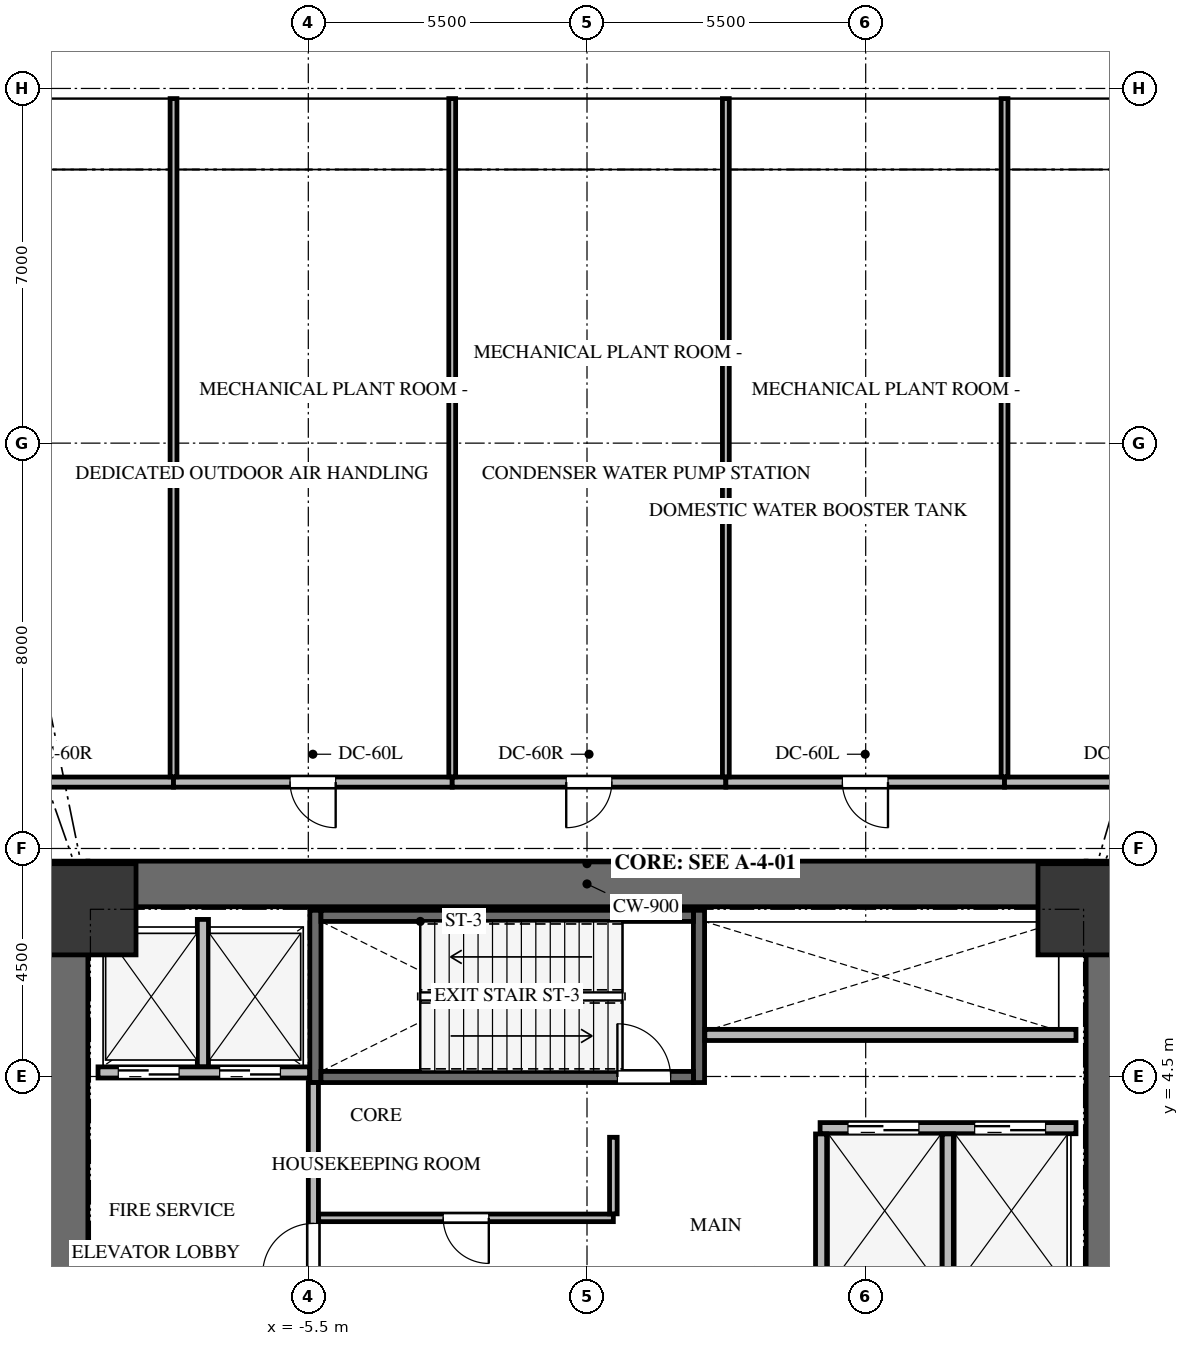
"""IFC4 building model, lengths in metres.
Left out: names, types, materials, properties, quantities, classifications, styles, units other than length and angle.
Written with IfcOpenShell. Run it as: python <this file> out.ifc"""

import sys

from ifc_helpers import new_model, si_unit, direction, frame, frame_2d, origin, origin_2d, place, context, subcontext, project, spatial, rectangle, extrude, source, transform, mapped, element, fill, save


model = new_model("IFC4")
c1 = context("Model", 3, precision=1e-05, world=origin(), true_north=direction((0.0, 1.0)))
c2 = subcontext(c1, "Body", "Model", "MODEL_VIEW")
j1 = project(units=[si_unit("LENGTHUNIT", "METRE"), si_unit("PLANEANGLEUNIT", "RADIAN")], contexts=[c1])
p1 = place(None, origin())
s1 = spatial("IfcSite", under=j1, at=p1, CompositionType="ELEMENT")
p2 = place(p1, origin())
s2 = spatial("IfcBuilding", under=s1, at=p2, CompositionType="ELEMENT")
p3 = place(p2, frame((0.0, 0.0, 10.4)))
s3 = spatial("IfcBuildingStorey", under=s2, at=p3, CompositionType="ELEMENT", Elevation=10.4)
for number, where, z_axis, x_axis in (
    (1, (-10.3, -8.75, 0.0), (0.0, 0.0, 1.0), (0.0, 1.0, 0.0)),
    (2, (10.3, -8.75, 0.0), (0.0, 0.0, 1.0), (0.0, 1.0, 0.0)),
):
    element("IfcWall", number, at=place(p3, frame(where, z_axis=z_axis, x_axis=x_axis)), inside=s3, PredefinedType="SHEAR", context=c2, shape_type="SweptSolid", body=[
        extrude(rectangle(XDim=17.5, YDim=0.9, at=frame_2d((8.75, 0.0))), origin(), (0.0, 0.0, 1.0), 5.2),
    ])
p4 = place(p3, frame((-9.85, 8.3, 0.0), z_axis=(0.0, 0.0, 1.0), x_axis=(1.0, 0.0, 0.0)))
e3 = element("IfcWall", 3, at=p4, inside=s3, PredefinedType="SHEAR", context=c2, shape_type="SweptSolid", body=[
    extrude(rectangle(XDim=19.7, YDim=0.9, at=frame_2d((9.85, 0.0))), origin(), (0.0, 0.0, 1.0), 5.2),
])
for number, where, z_axis, x_axis in (
    (4, (2.21, 4.38, -0.35), (0.0, 0.0, 1.0), (0.0, 1.0, 0.0)),
    (5, (-5.36, 7.78, -0.35), (0.0, 0.0, 1.0), (0.0, -1.0, 0.0)),
):
    element("IfcWall", number, at=place(p3, frame(where, z_axis=z_axis, x_axis=x_axis)), inside=s3, PredefinedType="SHEAR", context=c2, shape_type="SweptSolid", body=[
        extrude(rectangle(XDim=3.4, YDim=0.22, at=frame_2d((1.7, 0.0))), origin(), (0.0, 0.0, 1.0), 5.23),
    ])
p5 = place(p3, frame((-5.25, 4.49, -0.35), z_axis=(0.0, 0.0, 1.0), x_axis=(1.0, 0.0, 0.0)))
e6 = element("IfcWall", 6, at=p5, inside=s3, PredefinedType="SHEAR", context=c2, shape_type="SweptSolid", body=[
    extrude(rectangle(XDim=7.35, YDim=0.22, at=frame_2d((3.675, 0.0))), origin(), (0.0, 0.0, 1.0), 5.23),
])
p6 = place(p5, frame((5.85, 0.0, 0.0)))
e7 = element("IfcOpeningElement", 7, at=p6, cuts=e6, PredefinedType="OPENING", context=c2, shape_type="SweptSolid", body=[
    extrude(rectangle(XDim=1.05, YDim=2.15, at=frame_2d((0.525, 1.075))), frame((0.0, 0.12, 0.0), z_axis=(0.0, -1.0, 0.0), x_axis=(1.0, 0.0, 0.0)), (0.0, 0.0, 1.0), 0.24),
])
p7 = place(p3, frame((2.1, 7.67, -0.35), z_axis=(0.0, 0.0, 1.0), x_axis=(-1.0, 0.0, 0.0)))
e8 = element("IfcWall", 8, at=p7, inside=s3, PredefinedType="SHEAR", context=c2, shape_type="SweptSolid", body=[
    extrude(rectangle(XDim=7.35, YDim=0.22, at=frame_2d((3.675, 0.0))), origin(), (0.0, 0.0, 1.0), 5.23),
])
m1 = source(origin(), c2, "Body", "SweptSolid", [
    extrude(rectangle(XDim=1.8, YDim=1.8, at=origin_2d()), origin(), (0.0, 0.0, 1.0), 5.23),
])
for number, where, z_axis, x_axis in (
    (9, (9.8, 7.8, -0.35), (0.0, 0.0, 1.0), (1.0, 0.0, 0.0)),
    (10, (-9.8, 7.8, -0.35), (0.0, 0.0, 1.0), (1.0, 0.0, 0.0)),
):
    element("IfcColumn", number, at=place(p3, frame(where, z_axis=z_axis, x_axis=x_axis)), inside=s3, PredefinedType="COLUMN", context=c2, shape_type="MappedRepresentation", body=[
        mapped(m1, transform((0.0, 0.0, 0.0), x_axis=(1.0, 0.0, 0.0), y_axis=(0.0, 1.0, 0.0), z_axis=(0.0, 0.0, 1.0), scale=1.0)),
    ])
p8 = place(p3, frame((-9.65, 4.58, 0.0), z_axis=(0.0, 0.0, 1.0), x_axis=(1.0, 0.0, 0.0)))
e11 = element("IfcWall", 11, at=p8, inside=s3, PredefinedType="SOLIDWALL", context=c2, shape_type="SweptSolid", body=[
    extrude(rectangle(XDim=4.175, YDim=0.22, at=frame_2d((2.087, 0.0))), origin(), (0.0, 0.0, 1.0), 4.865),
])
p9 = place(p8, frame((0.4, 0.0, 0.0)))
e12 = element("IfcOpeningElement", 12, at=p9, cuts=e11, PredefinedType="OPENING", context=c2, shape_type="SweptSolid", body=[
    extrude(rectangle(XDim=1.2, YDim=2.15, at=frame_2d((0.6, 1.075))), frame((0.0, 0.12, 0.0), z_axis=(0.0, -1.0, 0.0), x_axis=(1.0, 0.0, 0.0)), (0.0, 0.0, 1.0), 0.24),
])
p10 = place(p8, frame((2.4, 0.0, 0.0)))
e13 = element("IfcOpeningElement", 13, at=p10, cuts=e11, PredefinedType="OPENING", context=c2, shape_type="SweptSolid", body=[
    extrude(rectangle(XDim=1.2, YDim=2.15, at=frame_2d((0.6, 1.075))), frame((0.0, 0.12, 0.0), z_axis=(0.0, -1.0, 0.0), x_axis=(1.0, 0.0, 0.0)), (0.0, 0.0, 1.0), 0.24),
])
p11 = place(p3, frame((-7.58, 4.694, 0.0), z_axis=(0.0, 0.0, 1.0), x_axis=(0.0, 1.0, 0.0)))
e14 = element("IfcWall", 14, at=p11, inside=s3, PredefinedType="SOLIDWALL", context=c2, shape_type="SweptSolid", body=[
    extrude(rectangle(XDim=2.906, YDim=0.22, at=frame_2d((1.453, 0.0))), origin(), (0.0, 0.0, 1.0), 4.865),
])
p12 = place(p3, frame((-5.4, 0.354, 0.0), z_axis=(0.0, 0.0, 1.0), x_axis=(0.0, 1.0, 0.0)))
e15 = element("IfcWall", 15, at=p12, inside=s3, PredefinedType="SOLIDWALL", context=c2, shape_type="SweptSolid", body=[
    extrude(rectangle(XDim=4.026, YDim=0.2, at=frame_2d((2.013, 0.0))), origin(), (0.0, 0.0, 1.0), 4.865),
])
p13 = place(p12, frame((0.246, 0.0, 0.0)))
e16 = element("IfcOpeningElement", 16, at=p13, cuts=e15, PredefinedType="OPENING", context=c2, shape_type="SweptSolid", body=[
    extrude(rectangle(XDim=1.0, YDim=2.15, at=frame_2d((0.5, 1.075))), frame((0.0, 0.11, 0.0), z_axis=(0.0, -1.0, 0.0), x_axis=(1.0, 0.0, 0.0)), (0.0, 0.0, 1.0), 0.22),
])
p14 = place(p3, frame((4.6, 3.48, 0.0), z_axis=(0.0, 0.0, 1.0), x_axis=(1.0, 0.0, 0.0)))
e17 = element("IfcWall", 17, at=p14, inside=s3, PredefinedType="SOLIDWALL", context=c2, shape_type="SweptSolid", body=[
    extrude(rectangle(XDim=5.05, YDim=0.22, at=frame_2d((2.525, 0.0))), origin(), (0.0, 0.0, 1.0), 4.865),
])
p15 = place(p14, frame((0.55, 0.0, 0.0)))
e18 = element("IfcOpeningElement", 18, at=p15, cuts=e17, PredefinedType="OPENING", context=c2, shape_type="SweptSolid", body=[
    extrude(rectangle(XDim=1.4, YDim=2.15, at=frame_2d((0.7, 1.075))), frame((0.0, 0.12, 0.0), z_axis=(0.0, -1.0, 0.0), x_axis=(1.0, 0.0, 0.0)), (0.0, 0.0, 1.0), 0.24),
])
p16 = place(p14, frame((3.05, 0.0, 0.0)))
e19 = element("IfcOpeningElement", 19, at=p16, cuts=e17, PredefinedType="OPENING", context=c2, shape_type="SweptSolid", body=[
    extrude(rectangle(XDim=1.4, YDim=2.15, at=frame_2d((0.7, 1.075))), frame((0.0, 0.12, 0.0), z_axis=(0.0, -1.0, 0.0), x_axis=(1.0, 0.0, 0.0)), (0.0, 0.0, 1.0), 0.24),
])
for number, where, z_axis, x_axis in (
    (20, (4.62, 0.18, 0.0), (0.0, 0.0, 1.0), (0.0, 1.0, 0.0)),
    (21, (7.12, 0.18, 0.0), (0.0, 0.0, 1.0), (0.0, 1.0, 0.0)),
):
    element("IfcWall", number, at=place(p3, frame(where, z_axis=z_axis, x_axis=x_axis)), inside=s3, PredefinedType="SOLIDWALL", context=c2, shape_type="SweptSolid", body=[
        extrude(rectangle(XDim=3.186, YDim=0.22, at=frame_2d((1.593, 0.0))), origin(), (0.0, 0.0, 1.0), 4.865),
    ])
p17 = place(p3, frame((2.325, 5.32, 0.0), z_axis=(0.0, 0.0, 1.0), x_axis=(1.0, 0.0, 0.0)))
e22 = element("IfcWall", 22, at=p17, inside=s3, PredefinedType="SOLIDWALL", context=c2, shape_type="SweptSolid", body=[
    extrude(rectangle(XDim=7.325, YDim=0.22, at=frame_2d((3.663, 0.0))), origin(), (0.0, 0.0, 1.0), 4.865),
])
p18 = place(p3, frame((0.52, 1.71, 0.0), z_axis=(0.0, 0.0, 1.0), x_axis=(-1.0, 0.0, 0.0)))
e23 = element("IfcWall", 23, at=p18, inside=s3, PredefinedType="PARTITIONING", context=c2, shape_type="SweptSolid", body=[
    extrude(rectangle(XDim=5.816, YDim=0.15, at=frame_2d((2.908, 0.0))), origin(), (0.0, 0.0, 1.0), 4.865),
])
p19 = place(p18, frame((2.458, 0.0, 0.0)))
e24 = element("IfcOpeningElement", 24, at=p19, cuts=e23, PredefinedType="OPENING", context=c2, shape_type="SweptSolid", body=[
    extrude(rectangle(XDim=0.9, YDim=2.05, at=frame_2d((0.45, 1.025))), frame((0.0, 0.085, 0.0), z_axis=(0.0, -1.0, 0.0), x_axis=(1.0, 0.0, 0.0)), (0.0, 0.0, 1.0), 0.17),
])
p20 = place(p3, frame((0.52, 3.3, 0.0), z_axis=(0.0, 0.0, 1.0), x_axis=(0.0, -1.0, 0.0)))
e25 = element("IfcWall", 25, at=p20, inside=s3, PredefinedType="PARTITIONING", context=c2, shape_type="SweptSolid", body=[
    extrude(rectangle(XDim=1.511, YDim=0.15, at=frame_2d((0.755, 0.0))), origin(), (0.0, 0.0, 1.0), 4.865),
])
p21 = place(p3, frame((-8.16, 10.31, 0.0), z_axis=(0.0, 0.0, 1.0), x_axis=(-1.0, 0.0, 0.0)))
e26 = element("IfcWall", 26, at=p21, inside=s3, PredefinedType="SOLIDWALL", context=c2, shape_type="SweptSolid", body=[
    extrude(rectangle(XDim=4.23, YDim=0.2, at=frame_2d((2.115, 0.0))), origin(), (0.0, 0.0, 1.0), 3.787),
])
p22 = place(p21, frame((2.93, 0.0, 0.0)))
e27 = element("IfcOpeningElement", 27, at=p22, cuts=e26, PredefinedType="OPENING", context=c2, shape_type="SweptSolid", body=[
    extrude(rectangle(XDim=0.9, YDim=2.05, at=frame_2d((0.45, 1.025))), frame((0.0, 0.11, 0.0), z_axis=(0.0, -1.0, 0.0), x_axis=(1.0, 0.0, 0.0)), (0.0, 0.0, 1.0), 0.22),
])
p23 = place(p3, frame((-2.66, 10.31, 0.0), z_axis=(0.0, 0.0, 1.0), x_axis=(-1.0, 0.0, 0.0)))
e28 = element("IfcWall", 28, at=p23, inside=s3, PredefinedType="SOLIDWALL", context=c2, shape_type="SweptSolid", body=[
    extrude(rectangle(XDim=5.5, YDim=0.2, at=frame_2d((2.75, 0.0))), origin(), (0.0, 0.0, 1.0), 4.418),
])
p24 = place(p23, frame((2.3, 0.0, 0.0)))
e29 = element("IfcOpeningElement", 29, at=p24, cuts=e28, PredefinedType="OPENING", context=c2, shape_type="SweptSolid", body=[
    extrude(rectangle(XDim=0.9, YDim=2.05, at=frame_2d((0.45, 1.025))), frame((0.0, 0.11, 0.0), z_axis=(0.0, -1.0, 0.0), x_axis=(1.0, 0.0, 0.0)), (0.0, 0.0, 1.0), 0.22),
])
p25 = place(p3, frame((2.74, 10.31, 0.0), z_axis=(0.0, 0.0, 1.0), x_axis=(-1.0, 0.0, 0.0)))
e30 = element("IfcWall", 30, at=p25, inside=s3, PredefinedType="SOLIDWALL", context=c2, shape_type="SweptSolid", body=[
    extrude(rectangle(XDim=5.4, YDim=0.2, at=frame_2d((2.7, 0.0))), origin(), (0.0, 0.0, 1.0), 4.418),
])
p26 = place(p25, frame((2.25, 0.0, 0.0)))
e31 = element("IfcOpeningElement", 31, at=p26, cuts=e30, PredefinedType="OPENING", context=c2, shape_type="SweptSolid", body=[
    extrude(rectangle(XDim=0.9, YDim=2.05, at=frame_2d((0.45, 1.025))), frame((0.0, 0.11, 0.0), z_axis=(0.0, -1.0, 0.0), x_axis=(1.0, 0.0, 0.0)), (0.0, 0.0, 1.0), 0.22),
])
p27 = place(p3, frame((8.24, 10.31, 0.0), z_axis=(0.0, 0.0, 1.0), x_axis=(-1.0, 0.0, 0.0)))
e32 = element("IfcWall", 32, at=p27, inside=s3, PredefinedType="SOLIDWALL", context=c2, shape_type="SweptSolid", body=[
    extrude(rectangle(XDim=5.5, YDim=0.2, at=frame_2d((2.75, 0.0))), origin(), (0.0, 0.0, 1.0), 4.418),
])
p28 = place(p27, frame((2.3, 0.0, 0.0)))
e33 = element("IfcOpeningElement", 33, at=p28, cuts=e32, PredefinedType="OPENING", context=c2, shape_type="SweptSolid", body=[
    extrude(rectangle(XDim=0.9, YDim=2.05, at=frame_2d((0.45, 1.025))), frame((0.0, 0.11, 0.0), z_axis=(0.0, -1.0, 0.0), x_axis=(1.0, 0.0, 0.0)), (0.0, 0.0, 1.0), 0.22),
])
p29 = place(p3, frame((12.39, 10.31, 0.0), z_axis=(0.0, 0.0, 1.0), x_axis=(-1.0, 0.0, 0.0)))
e34 = element("IfcWall", 34, at=p29, inside=s3, PredefinedType="SOLIDWALL", context=c2, shape_type="SweptSolid", body=[
    extrude(rectangle(XDim=4.15, YDim=0.2, at=frame_2d((2.075, 0.0))), origin(), (0.0, 0.0, 1.0), 3.787),
])
p30 = place(p29, frame((0.35, 0.0, 0.0)))
e35 = element("IfcOpeningElement", 35, at=p30, cuts=e34, PredefinedType="OPENING", context=c2, shape_type="SweptSolid", body=[
    extrude(rectangle(XDim=0.9, YDim=2.05, at=frame_2d((0.45, 1.025))), frame((0.0, 0.11, 0.0), z_axis=(0.0, -1.0, 0.0), x_axis=(1.0, 0.0, 0.0)), (0.0, 0.0, 1.0), 0.22),
])
for number, where, z_axis, x_axis in (
    (36, (-8.16, 23.8, 0.0), (0.0, 0.0, 1.0), (0.0, -1.0, 0.0)),
    (37, (-2.66, 23.8, 0.0), (0.0, 0.0, 1.0), (0.0, -1.0, 0.0)),
    (38, (2.74, 23.8, 0.0), (0.0, 0.0, 1.0), (0.0, -1.0, 0.0)),
    (39, (8.24, 23.8, 0.0), (0.0, 0.0, 1.0), (0.0, -1.0, 0.0)),
):
    element("IfcWall", number, at=place(p3, frame(where, z_axis=z_axis, x_axis=x_axis)), inside=s3, PredefinedType="PARTITIONING", context=c2, shape_type="SweptSolid", body=[
        extrude(rectangle(XDim=13.386, YDim=0.135, at=frame_2d((6.693, 0.0))), origin(), (0.0, 0.0, 1.0), 4.174),
    ])
m2 = source(origin(), c2, "Body", "SweptSolid", [
    extrude(rectangle(XDim=1.05, YDim=2.15, at=frame_2d((0.525, 1.075))), frame((0.0, 0.025, 0.0), z_axis=(0.0, -1.0, 0.0), x_axis=(1.0, 0.0, 0.0)), (0.0, 0.0, 1.0), 0.05),
])
p31 = place(p6, origin())
e40 = element("IfcDoor", 40, at=p31, inside=s3, OperationType="SINGLE_SWING_LEFT", PredefinedType="DOOR", context=c2, shape_type="MappedRepresentation", body=[
    mapped(m2, transform((0.0, 0.0, 0.0), x_axis=(1.0, 0.0, 0.0), y_axis=(0.0, 1.0, 0.0), z_axis=(0.0, 0.0, 1.0), scale=1.0)),
])
fill(e7, e40)
m3 = source(origin(), c2, "Body", "SweptSolid", [
    extrude(rectangle(XDim=1.2, YDim=2.15, at=frame_2d((0.6, 1.075))), frame((0.0, 0.025, 0.0), z_axis=(0.0, -1.0, 0.0), x_axis=(1.0, 0.0, 0.0)), (0.0, 0.0, 1.0), 0.05),
])
p32 = place(p9, origin())
e41 = element("IfcDoor", 41, at=p32, inside=s3, OperationType="DOUBLE_DOOR_SLIDING", PredefinedType="DOOR", context=c2, shape_type="MappedRepresentation", body=[
    mapped(m3, transform((0.0, 0.0, 0.0), x_axis=(1.0, 0.0, 0.0), y_axis=(0.0, 1.0, 0.0), z_axis=(0.0, 0.0, 1.0), scale=1.0)),
])
fill(e12, e41)
p33 = place(p10, origin())
e42 = element("IfcDoor", 42, at=p33, inside=s3, OperationType="DOUBLE_DOOR_SLIDING", PredefinedType="DOOR", context=c2, shape_type="MappedRepresentation", body=[
    mapped(m3, transform((0.0, 0.0, 0.0), x_axis=(1.0, 0.0, 0.0), y_axis=(0.0, 1.0, 0.0), z_axis=(0.0, 0.0, 1.0), scale=1.0)),
])
fill(e13, e42)
m4 = source(origin(), c2, "Body", "SweptSolid", [
    extrude(rectangle(XDim=1.0, YDim=2.15, at=frame_2d((0.5, 1.075))), frame((0.0, 0.025, 0.0), z_axis=(0.0, -1.0, 0.0), x_axis=(1.0, 0.0, 0.0)), (0.0, 0.0, 1.0), 0.05),
])
p34 = place(p13, origin())
e43 = element("IfcDoor", 43, at=p34, inside=s3, OperationType="SINGLE_SWING_LEFT", PredefinedType="DOOR", context=c2, shape_type="MappedRepresentation", body=[
    mapped(m4, transform((0.0, 0.0, 0.0), x_axis=(1.0, 0.0, 0.0), y_axis=(0.0, 1.0, 0.0), z_axis=(0.0, 0.0, 1.0), scale=1.0)),
])
fill(e16, e43)
m5 = source(origin(), c2, "Body", "SweptSolid", [
    extrude(rectangle(XDim=1.4, YDim=2.15, at=frame_2d((0.7, 1.075))), frame((0.0, 0.025, 0.0), z_axis=(0.0, -1.0, 0.0), x_axis=(1.0, 0.0, 0.0)), (0.0, 0.0, 1.0), 0.05),
])
p35 = place(p15, origin())
e44 = element("IfcDoor", 44, at=p35, inside=s3, OperationType="DOUBLE_DOOR_SLIDING", PredefinedType="DOOR", context=c2, shape_type="MappedRepresentation", body=[
    mapped(m5, transform((0.0, 0.0, 0.0), x_axis=(1.0, 0.0, 0.0), y_axis=(0.0, 1.0, 0.0), z_axis=(0.0, 0.0, 1.0), scale=1.0)),
])
fill(e18, e44)
p36 = place(p16, origin())
e45 = element("IfcDoor", 45, at=p36, inside=s3, OperationType="DOUBLE_DOOR_SLIDING", PredefinedType="DOOR", context=c2, shape_type="MappedRepresentation", body=[
    mapped(m5, transform((0.0, 0.0, 0.0), x_axis=(1.0, 0.0, 0.0), y_axis=(0.0, 1.0, 0.0), z_axis=(0.0, 0.0, 1.0), scale=1.0)),
])
fill(e19, e45)
m6 = source(origin(), c2, "Body", "SweptSolid", [
    extrude(rectangle(XDim=0.9, YDim=2.05, at=frame_2d((0.45, 1.025))), frame((0.0, 0.025, 0.0), z_axis=(0.0, -1.0, 0.0), x_axis=(1.0, 0.0, 0.0)), (0.0, 0.0, 1.0), 0.05),
])
p37 = place(p19, origin())
e46 = element("IfcDoor", 46, at=p37, inside=s3, OperationType="SINGLE_SWING_LEFT", PredefinedType="DOOR", context=c2, shape_type="MappedRepresentation", body=[
    mapped(m6, transform((0.0, 0.0, 0.0), x_axis=(1.0, 0.0, 0.0), y_axis=(0.0, 1.0, 0.0), z_axis=(0.0, 0.0, 1.0), scale=1.0)),
])
fill(e24, e46)
p38 = place(p24, origin())
e47 = element("IfcDoor", 47, at=p38, inside=s3, OperationType="SINGLE_SWING_LEFT", PredefinedType="DOOR", context=c2, shape_type="MappedRepresentation", body=[
    mapped(m6, transform((0.0, 0.0, 0.0), x_axis=(1.0, 0.0, 0.0), y_axis=(0.0, 1.0, 0.0), z_axis=(0.0, 0.0, 1.0), scale=1.0)),
])
fill(e29, e47)
m7 = source(origin(), c2, "Body", "SweptSolid", [
    extrude(rectangle(XDim=0.9, YDim=2.05, at=frame_2d((0.45, 1.025))), frame((0.0, 0.025, 0.0), z_axis=(0.0, -1.0, 0.0), x_axis=(1.0, 0.0, 0.0)), (0.0, 0.0, 1.0), 0.05),
])
p39 = place(p26, origin())
e48 = element("IfcDoor", 48, at=p39, inside=s3, OperationType="SINGLE_SWING_RIGHT", PredefinedType="DOOR", context=c2, shape_type="MappedRepresentation", body=[
    mapped(m7, transform((0.0, 0.0, 0.0), x_axis=(1.0, 0.0, 0.0), y_axis=(0.0, 1.0, 0.0), z_axis=(0.0, 0.0, 1.0), scale=1.0)),
])
fill(e31, e48)
p40 = place(p28, origin())
e49 = element("IfcDoor", 49, at=p40, inside=s3, OperationType="SINGLE_SWING_LEFT", PredefinedType="DOOR", context=c2, shape_type="MappedRepresentation", body=[
    mapped(m6, transform((0.0, 0.0, 0.0), x_axis=(1.0, 0.0, 0.0), y_axis=(0.0, 1.0, 0.0), z_axis=(0.0, 0.0, 1.0), scale=1.0)),
])
fill(e33, e49)
save(model, sys.argv[1])
